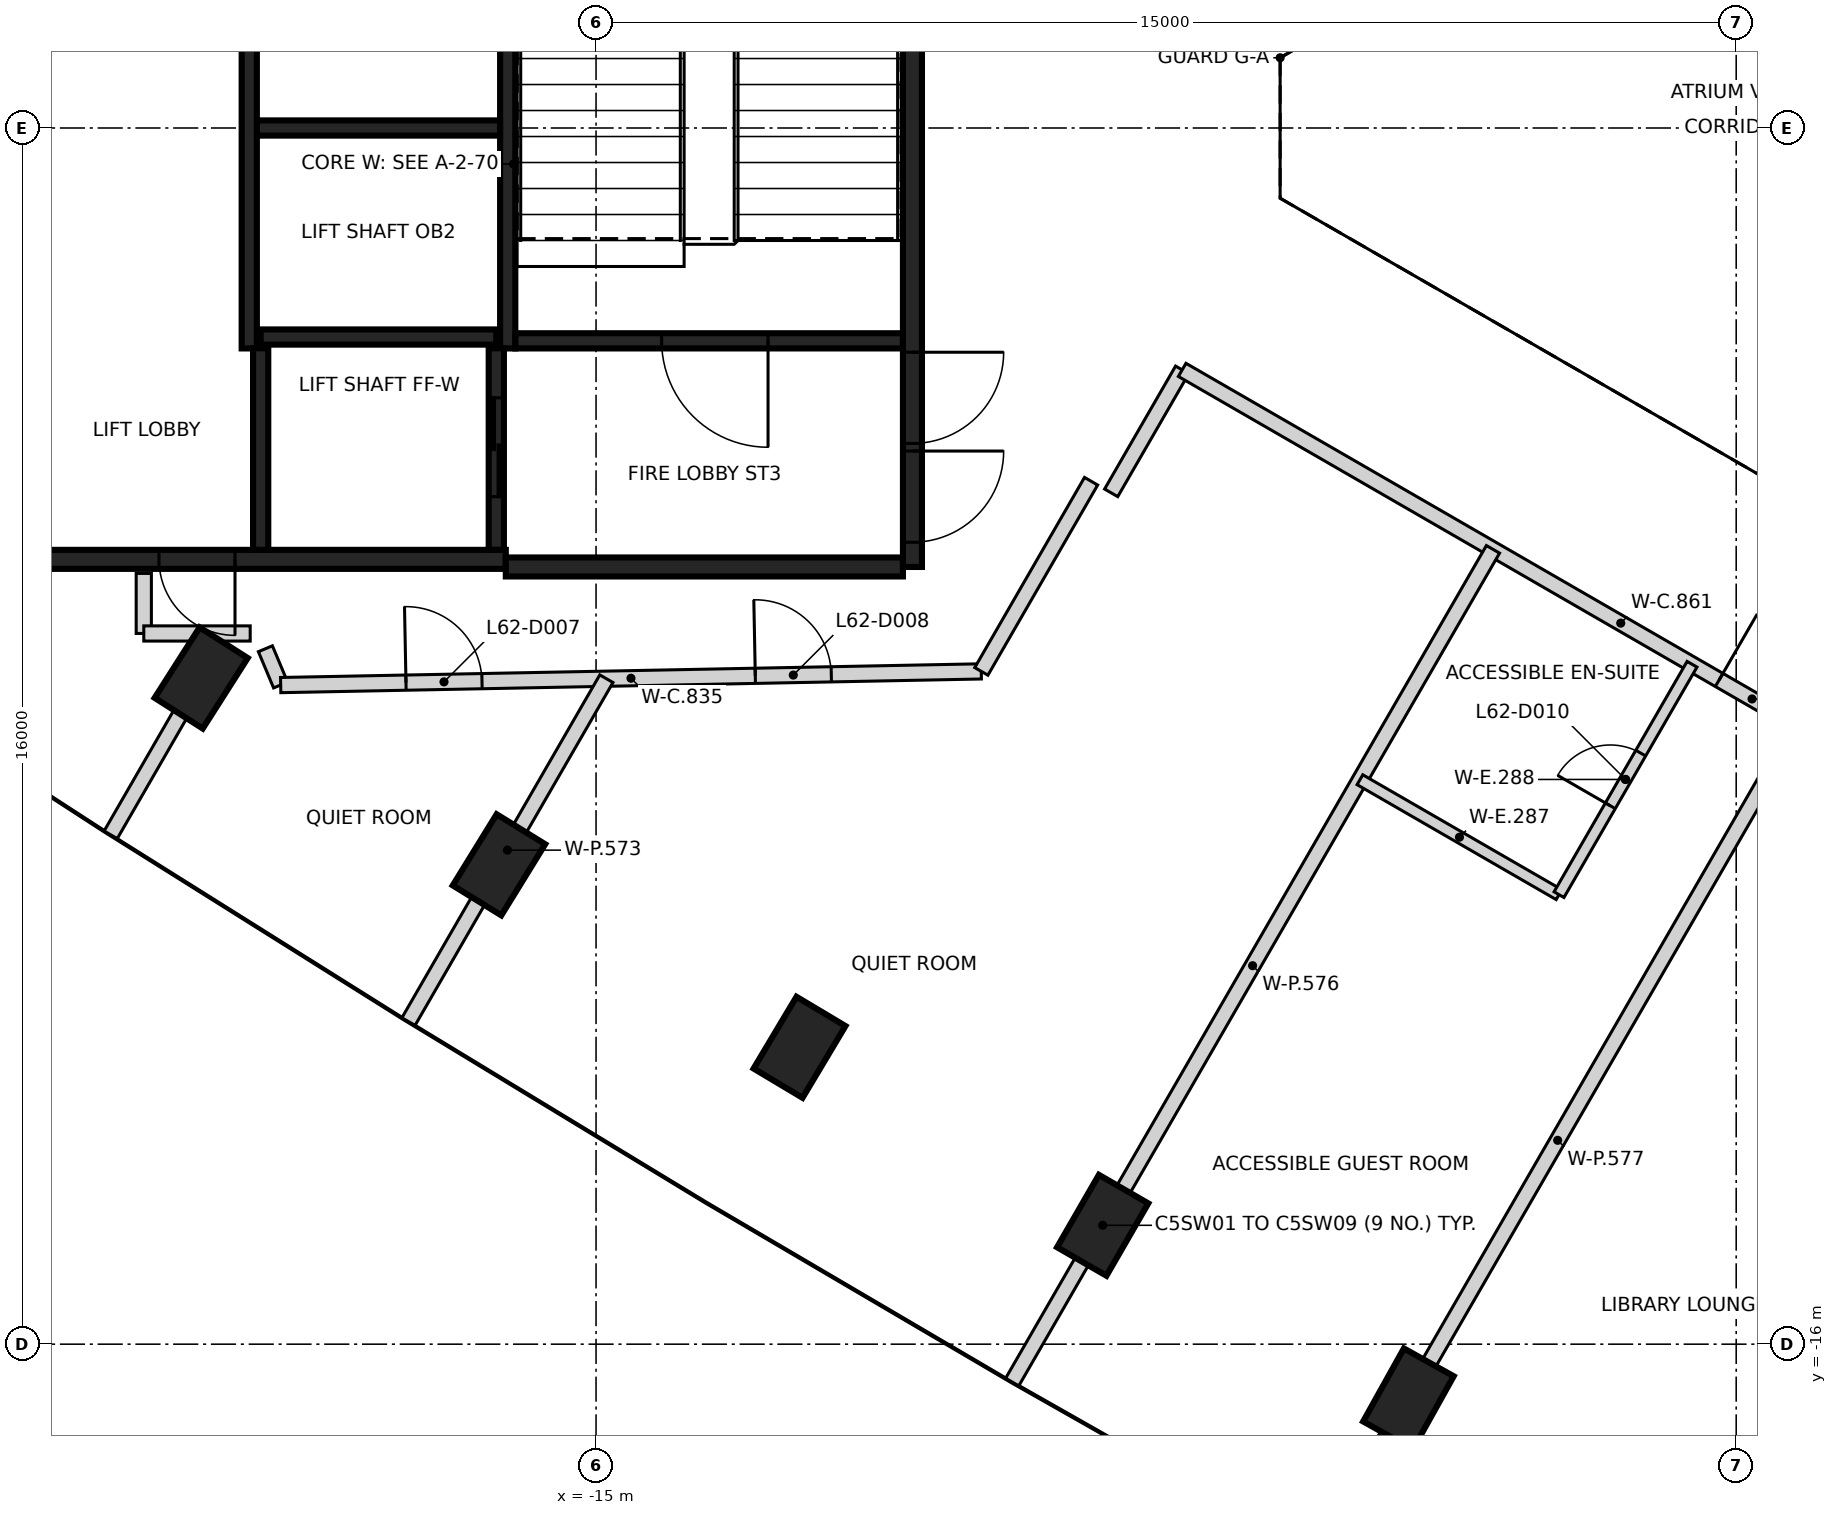
"""IFC4 building model, lengths in metres.
Left out: names, types, materials, properties, quantities, classifications, styles, units other than length and angle.
Written with IfcOpenShell. Run it as: python <this file> out.ifc"""

import sys

from ifc_helpers import new_model, si_unit, direction, frame, frame_2d, origin, origin_2d, place, context, subcontext, project, spatial, rectangle, extrude, element, fill, save


model = new_model("IFC4")
c1 = context("Model", 3, precision=1e-05, world=origin(), true_north=direction((0.0, 1.0)))
c2 = subcontext(c1, "Body", "Model", "MODEL_VIEW")
j1 = project(units=[si_unit("LENGTHUNIT", "METRE"), si_unit("PLANEANGLEUNIT", "RADIAN")], contexts=[c1])
p1 = place(None, origin())
s1 = spatial("IfcSite", under=j1, at=p1, CompositionType="ELEMENT")
p2 = place(p1, origin())
s2 = spatial("IfcBuilding", under=s1, at=p2, CompositionType="ELEMENT")
p3 = place(p2, frame((0.0, 0.0, 246.6)))
s3 = spatial("IfcBuildingStorey", under=s2, at=p3, CompositionType="ELEMENT", Elevation=246.6)
for number, where, z_axis, x_axis in (
    (1, (-20.195, -7.235, -0.35), (0.0, 0.0, 1.0), (0.538, 0.843, 0.0)),
    (2, (-16.277, -9.693, -0.35), (0.0, 0.0, 1.0), (0.525, 0.851, 0.0)),
    (3, (-12.323, -12.094, -0.35), (0.0, 0.0, 1.0), (0.513, 0.858, 0.0)),
    (4, (-8.335, -14.436, -0.35), (0.0, 0.0, 1.0), (0.5, 0.866, 0.0)),
    (5, (-4.312, -16.719, -0.35), (0.0, 0.0, 1.0), (0.487, 0.873, 0.0)),
):
    element("IfcColumn", number, at=place(p3, frame(where, z_axis=z_axis, x_axis=x_axis)), inside=s3, PredefinedType="COLUMN", context=c2, shape_type="SweptSolid", body=[
        extrude(rectangle(XDim=1.1, YDim=0.75, at=origin_2d()), origin(), (0.0, 0.0, 1.0), 3.6),
    ])
p4 = place(p3, frame((-10.837, 5.775, 0.0), z_axis=(0.0, 0.0, 1.0), x_axis=(0.0, -1.0, 0.0)))
e6 = element("IfcWall", 6, at=p4, inside=s3, PredefinedType="SHEAR", context=c2, shape_type="SweptSolid", body=[
    extrude(rectangle(XDim=11.55, YDim=0.25, at=frame_2d((5.775, 0.0))), origin(), (0.0, 0.0, 1.0), 3.25),
])
p5 = place(p4, frame((10.025, 0.0, 0.0)))
e7 = element("IfcOpeningElement", 7, at=p5, cuts=e6, PredefinedType="OPENING", context=c2, shape_type="SweptSolid", body=[
    extrude(rectangle(XDim=1.2, YDim=2.1, at=frame_2d((0.6, 1.05))), frame((0.0, 0.135, 0.0), z_axis=(0.0, -1.0, 0.0), x_axis=(1.0, 0.0, 0.0)), (0.0, 0.0, 1.0), 0.27),
])
p6 = place(p4, frame((8.725, 0.0, 0.0)))
e8 = element("IfcOpeningElement", 8, at=p6, cuts=e6, PredefinedType="OPENING", context=c2, shape_type="SweptSolid", body=[
    extrude(rectangle(XDim=1.2, YDim=2.1, at=frame_2d((0.6, 1.05))), frame((0.0, 0.135, 0.0), z_axis=(0.0, -1.0, 0.0), x_axis=(1.0, 0.0, 0.0)), (0.0, 0.0, 1.0), 0.27),
])
p7 = place(p3, frame((-16.187, -5.675, 0.0), z_axis=(0.0, 0.0, 1.0), x_axis=(-1.0, 0.0, 0.0)))
e9 = element("IfcWall", 9, at=p7, inside=s3, PredefinedType="SHEAR", context=c2, shape_type="SweptSolid", body=[
    extrude(rectangle(XDim=6.125, YDim=0.25, at=frame_2d((3.062, 0.0))), origin(), (0.0, 0.0, 1.0), 3.25),
])
p8 = place(p7, frame((3.563, 0.0, 0.0)))
e10 = element("IfcOpeningElement", 10, at=p8, cuts=e9, PredefinedType="OPENING", context=c2, shape_type="SweptSolid", body=[
    extrude(rectangle(XDim=1.0, YDim=2.1, at=frame_2d((0.5, 1.05))), frame((0.0, 0.135, 0.0), z_axis=(0.0, -1.0, 0.0), x_axis=(1.0, 0.0, 0.0)), (0.0, 0.0, 1.0), 0.27),
])
p9 = place(p3, frame((-10.963, -5.775, 0.0), z_axis=(0.0, 0.0, 1.0), x_axis=(-1.0, 0.0, 0.0)))
e11 = element("IfcWall", 11, at=p9, inside=s3, PredefinedType="SHEAR", context=c2, shape_type="SweptSolid", body=[
    extrude(rectangle(XDim=5.225, YDim=0.25, at=frame_2d((2.612, 0.0))), origin(), (0.0, 0.0, 1.0), 3.25),
])
p10 = place(p3, frame((-16.162, 3.074, 0.0), z_axis=(0.0, 0.0, 1.0), x_axis=(0.0, -1.0, 0.0)))
e12 = element("IfcWall", 12, at=p10, inside=s3, PredefinedType="SHEAR", context=c2, shape_type="SweptSolid", body=[
    extrude(rectangle(XDim=5.974, YDim=0.2, at=frame_2d((2.987, 0.0))), origin(), (0.0, 0.0, 1.0), 3.25),
])
p11 = place(p3, frame((-19.562, -2.9, 0.0), z_axis=(0.0, 0.0, 1.0), x_axis=(0.0, 1.0, 0.0)))
e13 = element("IfcWall", 13, at=p11, inside=s3, PredefinedType="SHEAR", context=c2, shape_type="SweptSolid", body=[
    extrude(rectangle(XDim=6.1, YDim=0.2, at=frame_2d((3.05, 0.0))), origin(), (0.0, 0.0, 1.0), 3.25),
])
p12 = place(p3, frame((-10.963, -2.8, 0.0), z_axis=(0.0, 0.0, 1.0), x_axis=(-1.0, 0.0, 0.0)))
e14 = element("IfcWall", 14, at=p12, inside=s3, PredefinedType="SHEAR", context=c2, shape_type="SweptSolid", body=[
    extrude(rectangle(XDim=5.098, YDim=0.2, at=frame_2d((2.549, 0.0))), origin(), (0.0, 0.0, 1.0), 3.25),
])
p13 = place(p12, frame((1.774, 0.0, 0.0)))
e15 = element("IfcOpeningElement", 15, at=p13, cuts=e14, PredefinedType="OPENING", context=c2, shape_type="SweptSolid", body=[
    extrude(rectangle(XDim=1.4, YDim=2.1, at=frame_2d((0.7, 1.05))), frame((0.0, 0.11, 0.0), z_axis=(0.0, -1.0, 0.0), x_axis=(1.0, 0.0, 0.0)), (0.0, 0.0, 1.0), 0.22),
])
p14 = place(p3, frame((-16.263, 0.0, 0.0), z_axis=(0.0, 0.0, 1.0), x_axis=(-1.0, 0.0, 0.0)))
e16 = element("IfcWall", 16, at=p14, inside=s3, PredefinedType="SHEAR", context=c2, shape_type="SweptSolid", body=[
    extrude(rectangle(XDim=3.198, YDim=0.2, at=frame_2d((1.599, 0.0))), origin(), (0.0, 0.0, 1.0), 3.25),
])
p15 = place(p3, frame((-19.412, -2.75, 0.0), z_axis=(0.0, 0.0, 1.0), x_axis=(1.0, 0.0, 0.0)))
e17 = element("IfcWall", 17, at=p15, inside=s3, PredefinedType="SHEAR", context=c2, shape_type="SweptSolid", body=[
    extrude(rectangle(XDim=3.1, YDim=0.2, at=frame_2d((1.55, 0.0))), origin(), (0.0, 0.0, 1.0), 3.25),
])
p16 = place(p3, frame((-16.312, -2.898, 0.0), z_axis=(0.0, 0.0, 1.0), x_axis=(0.0, -1.0, 0.0)))
e18 = element("IfcWall", 18, at=p16, inside=s3, PredefinedType="SHEAR", context=c2, shape_type="SweptSolid", body=[
    extrude(rectangle(XDim=2.651, YDim=0.2, at=frame_2d((1.325, 0.0))), origin(), (0.0, 0.0, 1.0), 3.25),
])
p17 = place(p16, frame((0.652, 0.0, 0.0)))
e19 = element("IfcOpeningElement", 19, at=p17, cuts=e18, PredefinedType="OPENING", context=c2, shape_type="SweptSolid", body=[
    extrude(rectangle(XDim=1.3, YDim=2.1, at=frame_2d((0.65, 1.05))), frame((0.0, 0.11, 0.0), z_axis=(0.0, -1.0, 0.0), x_axis=(1.0, 0.0, 0.0)), (0.0, 0.0, 1.0), 0.22),
])
p18 = place(p3, frame((-19.412, -5.549, 0.0), z_axis=(0.0, 0.0, 1.0), x_axis=(0.0, 1.0, 0.0)))
e20 = element("IfcWall", 20, at=p18, inside=s3, PredefinedType="SHEAR", context=c2, shape_type="SweptSolid", body=[
    extrude(rectangle(XDim=2.651, YDim=0.2, at=frame_2d((1.325, 0.0))), origin(), (0.0, 0.0, 1.0), 3.25),
])
p19 = place(p3, frame((-20.95, -6.65, 0.0), z_axis=(0.0, 0.0, 1.0), x_axis=(0.0, 1.0, 0.0)))
e21 = element("IfcWall", 21, at=p19, inside=s3, PredefinedType="PARTITIONING", context=c2, shape_type="SweptSolid", body=[
    extrude(rectangle(XDim=0.79, YDim=0.2, at=frame_2d((0.395, 0.0))), origin(), (0.0, 0.0, 1.0), 2.35),
])
p20 = place(p3, frame((-20.95, -6.65, 0.0), z_axis=(0.0, 0.0, 1.0), x_axis=(1.0, 0.0, 0.0)))
e22 = element("IfcWall", 22, at=p20, inside=s3, PredefinedType="PARTITIONING", context=c2, shape_type="SweptSolid", body=[
    extrude(rectangle(XDim=1.4, YDim=0.2, at=frame_2d((0.7, 0.0))), origin(), (0.0, 0.0, 1.0), 2.35),
])
p21 = place(p3, frame((-19.15, -7.328, 0.0), z_axis=(0.0, 0.0, 1.0), x_axis=(-0.38712813986, 0.92202592335, 0.0)))
e23 = element("IfcWall", 23, at=p21, inside=s3, PredefinedType="PARTITIONING", context=c2, shape_type="SweptSolid", body=[
    extrude(rectangle(XDim=0.517, YDim=0.2, at=frame_2d((0.259, 0.0))), origin(), (0.0, 0.0, 1.0), 3.25),
])
p22 = place(p3, frame((-19.149, -7.329, 0.0), z_axis=(0.0, 0.0, 1.0), x_axis=(0.999808990333, 0.019544381503, 0.0)))
e24 = element("IfcWall", 24, at=p22, inside=s3, PredefinedType="PARTITIONING", context=c2, shape_type="SweptSolid", body=[
    extrude(rectangle(XDim=9.219, YDim=0.2, at=frame_2d((4.609, 0.0))), origin(), (0.0, 0.0, 1.0), 3.25),
])
p23 = place(p22, frame((1.649, 0.0, 0.0)))
e25 = element("IfcOpeningElement", 25, at=p23, cuts=e24, PredefinedType="OPENING", context=c2, shape_type="SweptSolid", body=[
    extrude(rectangle(XDim=1.0, YDim=2.1, at=frame_2d((0.5, 1.05))), frame((0.0, 0.11, 0.0), z_axis=(0.0, -1.0, 0.0), x_axis=(1.0, 0.0, 0.0)), (0.0, 0.0, 1.0), 0.22),
])
p24 = place(p22, frame((6.245, 0.0, 0.0)))
e26 = element("IfcOpeningElement", 26, at=p24, cuts=e24, PredefinedType="OPENING", context=c2, shape_type="SweptSolid", body=[
    extrude(rectangle(XDim=1.0, YDim=2.1, at=frame_2d((0.5, 1.05))), frame((0.0, 0.11, 0.0), z_axis=(0.0, -1.0, 0.0), x_axis=(1.0, 0.0, 0.0)), (0.0, 0.0, 1.0), 0.22),
])
p25 = place(p3, frame((-9.931, -7.149, 0.0), z_axis=(0.0, 0.0, 1.0), x_axis=(0.499829760107, 0.866123669525, 0.0)))
e27 = element("IfcWall", 27, at=p25, inside=s3, PredefinedType="PARTITIONING", context=c2, shape_type="SweptSolid", body=[
    extrude(rectangle(XDim=2.889, YDim=0.2, at=frame_2d((1.444, 0.0))), origin(), (0.0, 0.0, 1.0), 3.25),
])
p26 = place(p3, frame((-8.223, -4.8, 0.0), z_axis=(0.0, 0.0, 1.0), x_axis=(0.499835576036, 0.866120313195, 0.0)))
e28 = element("IfcWall", 28, at=p26, inside=s3, PredefinedType="PARTITIONING", context=c2, shape_type="SweptSolid", body=[
    extrude(rectangle(XDim=1.868, YDim=0.2, at=frame_2d((0.934, 0.0))), origin(), (0.0, 0.0, 1.0), 3.25),
])
p27 = place(p3, frame((-7.289, -3.182, 0.0), z_axis=(0.0, 0.0, 1.0), x_axis=(0.865979329032, -0.500079795322, 0.0)))
e29 = element("IfcWall", 29, at=p27, inside=s3, PredefinedType="PARTITIONING", context=c2, shape_type="SweptSolid", body=[
    extrude(rectangle(XDim=13.326, YDim=0.2, at=frame_2d((6.663, 0.0))), origin(), (0.0, 0.0, 1.0), 3.25),
])
p28 = place(p27, frame((8.158, 0.0, 0.0)))
e30 = element("IfcOpeningElement", 30, at=p28, cuts=e29, PredefinedType="OPENING", context=c2, shape_type="SweptSolid", body=[
    extrude(rectangle(XDim=1.0, YDim=2.1, at=frame_2d((0.5, 1.05))), frame((0.0, 0.11, 0.0), z_axis=(0.0, -1.0, 0.0), x_axis=(1.0, 0.0, 0.0)), (0.0, 0.0, 1.0), 0.22),
])
p29 = place(p27, frame((10.865, 0.0, 0.0)))
e31 = element("IfcOpeningElement", 31, at=p29, cuts=e29, PredefinedType="OPENING", context=c2, shape_type="SweptSolid", body=[
    extrude(rectangle(XDim=1.0, YDim=2.1, at=frame_2d((0.5, 1.05))), frame((0.0, 0.11, 0.0), z_axis=(0.0, -1.0, 0.0), x_axis=(1.0, 0.0, 0.0)), (0.0, 0.0, 1.0), 0.22),
])
p30 = place(p3, frame((-21.385, -9.299, 0.0), z_axis=(0.0, 0.0, 1.0), x_axis=(0.499818570291, 0.86613012694, 0.0)))
e32 = element("IfcWall", 32, at=p30, inside=s3, PredefinedType="PARTITIONING", context=c2, shape_type="SweptSolid", body=[
    extrude(rectangle(XDim=2.712, YDim=0.2, at=frame_2d((1.356, 0.0))), origin(), (0.0, 0.0, 1.0), 3.25),
])
p31 = place(p3, frame((-17.468, -11.756, 0.0), z_axis=(0.0, 0.0, 1.0), x_axis=(0.499890179513, 0.866088799389, 0.0)))
e33 = element("IfcWall", 33, at=p31, inside=s3, PredefinedType="PARTITIONING", context=c2, shape_type="SweptSolid", body=[
    extrude(rectangle(XDim=5.208, YDim=0.2, at=frame_2d((2.604, 0.0))), origin(), (0.0, 0.0, 1.0), 3.25),
])
p32 = place(p3, frame((-9.525, -16.498, 0.0), z_axis=(0.0, 0.0, 1.0), x_axis=(0.500002007972, 0.866024244478, 0.0)))
e34 = element("IfcWall", 34, at=p32, inside=s3, PredefinedType="PARTITIONING", context=c2, shape_type="SweptSolid", body=[
    extrude(rectangle(XDim=12.65, YDim=0.2, at=frame_2d((6.325, 0.0))), origin(), (0.0, 0.0, 1.0), 3.25),
])
p33 = place(p3, frame((-5.503, -18.781, 0.0), z_axis=(0.0, 0.0, 1.0), x_axis=(0.499968699423, 0.866043474427, 0.0)))
e35 = element("IfcWall", 35, at=p33, inside=s3, PredefinedType="PARTITIONING", context=c2, shape_type="SweptSolid", body=[
    extrude(rectangle(XDim=12.616, YDim=0.2, at=frame_2d((6.308, 0.0))), origin(), (0.0, 0.0, 1.0), 3.25),
])
p34 = place(p3, frame((-4.95, -8.574, 0.0), z_axis=(0.0, 0.0, 1.0), x_axis=(0.866033665757, -0.499985689571, 0.0)))
e36 = element("IfcWall", 36, at=p34, inside=s3, PredefinedType="PARTITIONING", context=c2, shape_type="SweptSolid", body=[
    extrude(rectangle(XDim=3.024, YDim=0.15, at=frame_2d((1.512, 0.0))), origin(), (0.0, 0.0, 1.0), 3.25),
])
p35 = place(p3, frame((-2.331, -10.086, 0.0), z_axis=(0.0, 0.0, 1.0), x_axis=(0.500010275428, 0.866019471182, 0.0)))
e37 = element("IfcWall", 37, at=p35, inside=s3, PredefinedType="PARTITIONING", context=c2, shape_type="SweptSolid", body=[
    extrude(rectangle(XDim=3.5, YDim=0.15, at=frame_2d((1.75, 0.0))), origin(), (0.0, 0.0, 1.0), 3.25),
])
p36 = place(p35, frame((1.35, 0.0, 0.0)))
e38 = element("IfcOpeningElement", 38, at=p36, cuts=e37, PredefinedType="OPENING", context=c2, shape_type="SweptSolid", body=[
    extrude(rectangle(XDim=0.8, YDim=2.1, at=frame_2d((0.4, 1.05))), frame((0.0, 0.085, 0.0), z_axis=(0.0, -1.0, 0.0), x_axis=(1.0, 0.0, 0.0)), (0.0, 0.0, 1.0), 0.17),
])
p37 = place(p17, origin())
e39 = element("IfcDoor", 39, at=p37, inside=s3, OperationType="SLIDING_TO_LEFT", PredefinedType="DOOR", context=c2, shape_type="SweptSolid", body=[
    extrude(rectangle(XDim=1.3, YDim=2.1, at=frame_2d((0.65, 1.05))), frame((0.0, 0.025, 0.0), z_axis=(0.0, -1.0, 0.0), x_axis=(1.0, 0.0, 0.0)), (0.0, 0.0, 1.0), 0.05),
])
fill(e19, e39)
p38 = place(p8, origin())
e40 = element("IfcDoor", 40, at=p38, inside=s3, OperationType="SINGLE_SWING_LEFT", PredefinedType="DOOR", context=c2, shape_type="SweptSolid", body=[
    extrude(rectangle(XDim=1.0, YDim=2.1, at=frame_2d((0.5, 1.05))), frame((0.0, 0.025, 0.0), z_axis=(0.0, -1.0, 0.0), x_axis=(1.0, 0.0, 0.0)), (0.0, 0.0, 1.0), 0.05),
])
fill(e10, e40)
p39 = place(p5, origin())
e41 = element("IfcDoor", 41, at=p39, inside=s3, OperationType="SINGLE_SWING_LEFT", PredefinedType="DOOR", context=c2, shape_type="SweptSolid", body=[
    extrude(rectangle(XDim=1.2, YDim=2.1, at=frame_2d((0.6, 1.05))), frame((0.0, 0.025, 0.0), z_axis=(0.0, -1.0, 0.0), x_axis=(1.0, 0.0, 0.0)), (0.0, 0.0, 1.0), 0.05),
])
fill(e7, e41)
p40 = place(p6, origin())
e42 = element("IfcDoor", 42, at=p40, inside=s3, OperationType="SINGLE_SWING_RIGHT", PredefinedType="DOOR", context=c2, shape_type="SweptSolid", body=[
    extrude(rectangle(XDim=1.2, YDim=2.1, at=frame_2d((0.6, 1.05))), frame((0.0, 0.025, 0.0), z_axis=(0.0, -1.0, 0.0), x_axis=(1.0, 0.0, 0.0)), (0.0, 0.0, 1.0), 0.05),
])
fill(e8, e42)
p41 = place(p13, origin())
e43 = element("IfcDoor", 43, at=p41, inside=s3, OperationType="SINGLE_SWING_LEFT", PredefinedType="DOOR", context=c2, shape_type="SweptSolid", body=[
    extrude(rectangle(XDim=1.4, YDim=2.1, at=frame_2d((0.7, 1.05))), frame((0.0, 0.025, 0.0), z_axis=(0.0, -1.0, 0.0), x_axis=(1.0, 0.0, 0.0)), (0.0, 0.0, 1.0), 0.05),
])
fill(e15, e43)
p42 = place(p23, frame((1.0, 0.0, 0.0), z_axis=(0.0, 0.0, 1.0), x_axis=(-1.0, 0.0, 0.0)))
e44 = element("IfcDoor", 44, at=p42, inside=s3, OperationType="SINGLE_SWING_LEFT", PredefinedType="DOOR", context=c2, shape_type="SweptSolid", body=[
    extrude(rectangle(XDim=1.0, YDim=2.1, at=frame_2d((0.5, 1.05))), frame((0.0, 0.025, 0.0), z_axis=(0.0, -1.0, 0.0), x_axis=(1.0, 0.0, 0.0)), (0.0, 0.0, 1.0), 0.05),
])
fill(e25, e44)
p43 = place(p24, frame((1.0, 0.0, 0.0), z_axis=(0.0, 0.0, 1.0), x_axis=(-1.0, 0.0, 0.0)))
e45 = element("IfcDoor", 45, at=p43, inside=s3, OperationType="SINGLE_SWING_LEFT", PredefinedType="DOOR", context=c2, shape_type="SweptSolid", body=[
    extrude(rectangle(XDim=1.0, YDim=2.1, at=frame_2d((0.5, 1.05))), frame((0.0, 0.025, 0.0), z_axis=(0.0, -1.0, 0.0), x_axis=(1.0, 0.0, 0.0)), (0.0, 0.0, 1.0), 0.05),
])
fill(e26, e45)
p44 = place(p28, frame((1.0, 0.0, 0.0), z_axis=(0.0, 0.0, 1.0), x_axis=(-1.0, 0.0, 0.0)))
e46 = element("IfcDoor", 46, at=p44, inside=s3, OperationType="SINGLE_SWING_LEFT", PredefinedType="DOOR", context=c2, shape_type="SweptSolid", body=[
    extrude(rectangle(XDim=1.0, YDim=2.1, at=frame_2d((0.5, 1.05))), frame((0.0, 0.025, 0.0), z_axis=(0.0, -1.0, 0.0), x_axis=(1.0, 0.0, 0.0)), (0.0, 0.0, 1.0), 0.05),
])
fill(e30, e46)
p45 = place(p36, origin())
e47 = element("IfcDoor", 47, at=p45, inside=s3, OperationType="SINGLE_SWING_LEFT", PredefinedType="DOOR", context=c2, shape_type="SweptSolid", body=[
    extrude(rectangle(XDim=0.8, YDim=2.1, at=frame_2d((0.4, 1.05))), frame((0.0, 0.025, 0.0), z_axis=(0.0, -1.0, 0.0), x_axis=(1.0, 0.0, 0.0)), (0.0, 0.0, 1.0), 0.05),
])
fill(e38, e47)
save(model, sys.argv[1])
